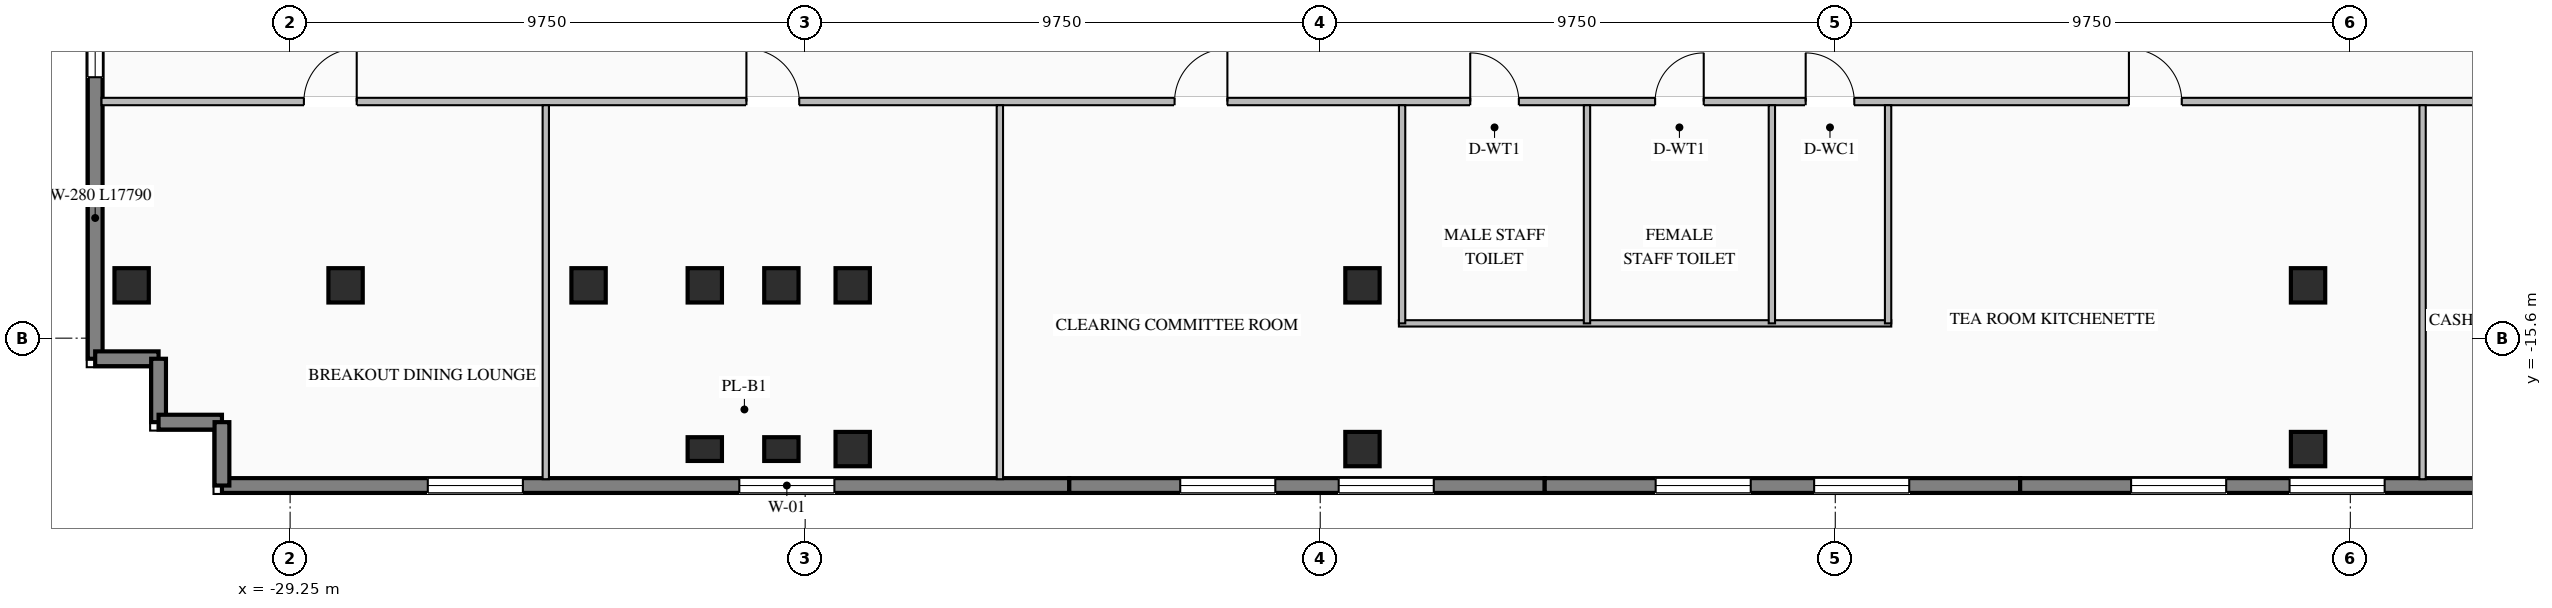
"""IFC4 building model, lengths in metres.
Left out: names, types, materials, properties, quantities, classifications, styles, units other than length and angle.
Written with IfcOpenShell. Run it as: python <this file> out.ifc"""

import sys

from ifc_helpers import new_model, si_unit, direction, frame, frame_2d, origin, origin_2d, place, context, subcontext, project, spatial, rectangle, i_section, extrude, element, fill, save


model = new_model("IFC4")
c1 = context("Model", 3, precision=1e-05, world=origin(), true_north=direction((0.0, 1.0)))
c2 = subcontext(c1, "Body", "Model", "MODEL_VIEW")
j1 = project(units=[si_unit("LENGTHUNIT", "METRE"), si_unit("PLANEANGLEUNIT", "RADIAN")], contexts=[c1])
p1 = place(None, origin())
s1 = spatial("IfcSite", under=j1, at=p1, CompositionType="ELEMENT")
p2 = place(p1, origin())
s2 = spatial("IfcBuilding", under=s1, at=p2, CompositionType="ELEMENT")
p3 = place(p2, frame((0.0, 0.0, 141.55)))
s3 = spatial("IfcBuildingStorey", under=s2, at=p3, CompositionType="ELEMENT", Elevation=141.55)
for number, where, z_axis, x_axis in (
    (1, (-21.4, -14.6, 0.0), (0.0, 0.0, 1.0), (1.0, 0.0, 0.0)),
    (2, (-19.95, -14.6, 0.0), (0.0, 0.0, 1.0), (1.0, 0.0, 0.0)),
    (3, (-18.6, -14.6, 0.0), (0.0, 0.0, 1.0), (1.0, 0.0, 0.0)),
    (4, (-8.95, -14.6, 0.0), (0.0, 0.0, 1.0), (1.0, 0.0, 0.0)),
    (5, (8.95, -14.6, 0.0), (0.0, 0.0, 1.0), (1.0, 0.0, 0.0)),
    (6, (-23.6, -14.6, 0.0), (0.0, 0.0, 1.0), (1.0, 0.0, 0.0)),
    (7, (-28.2, -14.6, 0.0), (0.0, 0.0, 1.0), (1.0, 0.0, 0.0)),
    (8, (-18.6, -17.7, 0.0), (0.0, 0.0, 1.0), (1.0, 0.0, 0.0)),
    (9, (-8.95, -17.7, 0.0), (0.0, 0.0, 1.0), (1.0, 0.0, 0.0)),
    (10, (8.95, -17.7, 0.0), (0.0, 0.0, 1.0), (1.0, 0.0, 0.0)),
    (11, (-32.25, -14.6, 0.0), (0.0, 0.0, 1.0), (1.0, 0.0, 0.0)),
):
    element("IfcColumn", number, at=place(p3, frame(where, z_axis=z_axis, x_axis=x_axis)), inside=s3, PredefinedType="COLUMN", context=c2, shape_type="SweptSolid", body=[
        extrude(i_section(OverallWidth=0.65, OverallDepth=0.65, WebThickness=0.028, FlangeThickness=0.04, at=origin_2d()), origin(), (0.0, 0.0, 1.0), 3.45),
    ])
for number, where, z_axis, x_axis in (
    (12, (-21.4, -17.7, 0.0), (0.0, 0.0, 1.0), (1.0, 0.0, 0.0)),
    (13, (-19.95, -17.7, 0.0), (0.0, 0.0, 1.0), (1.0, 0.0, 0.0)),
):
    element("IfcColumn", number, at=place(p3, frame(where, z_axis=z_axis, x_axis=x_axis)), inside=s3, PredefinedType="PILASTER", context=c2, shape_type="SweptSolid", body=[
        extrude(rectangle(XDim=0.65, YDim=0.45, at=origin_2d()), origin(), (0.0, 0.0, 1.0), 3.45),
    ])
p4 = place(p3, frame((-14.5, -18.39, 0.0), z_axis=(0.0, 0.0, 1.0), x_axis=(-1.0, 0.0, 0.0)))
e14 = element("IfcWall", 14, at=p4, inside=s3, PredefinedType="STANDARD", context=c2, shape_type="SweptSolid", body=[
    extrude(rectangle(XDim=16.04, YDim=0.28, at=frame_2d((8.02, 0.0))), origin(), (0.0, 0.0, 1.0), 3.25),
])
p5 = place(p4, frame((4.447, 0.0, 0.76)))
e15 = element("IfcOpeningElement", 15, at=p5, cuts=e14, PredefinedType="OPENING", context=c2, shape_type="SweptSolid", body=[
    extrude(rectangle(XDim=1.8, YDim=1.95, at=frame_2d((0.9, 0.975))), frame((0.0, 0.15, 0.0), z_axis=(0.0, -1.0, 0.0), x_axis=(1.0, 0.0, 0.0)), (0.0, 0.0, 1.0), 0.3),
])
p6 = place(p4, frame((10.343, 0.0, 0.76)))
e16 = element("IfcOpeningElement", 16, at=p6, cuts=e14, PredefinedType="OPENING", context=c2, shape_type="SweptSolid", body=[
    extrude(rectangle(XDim=1.8, YDim=1.95, at=frame_2d((0.9, 0.975))), frame((0.0, 0.15, 0.0), z_axis=(0.0, -1.0, 0.0), x_axis=(1.0, 0.0, 0.0)), (0.0, 0.0, 1.0), 0.3),
])
p7 = place(p3, frame((-5.5, -18.39, 0.0), z_axis=(0.0, 0.0, 1.0), x_axis=(-1.0, 0.0, 0.0)))
e17 = element("IfcWall", 17, at=p7, inside=s3, PredefinedType="STANDARD", context=c2, shape_type="SweptSolid", body=[
    extrude(rectangle(XDim=9.0, YDim=0.28, at=frame_2d((4.5, 0.0))), origin(), (0.0, 0.0, 1.0), 3.25),
])
p8 = place(p7, frame((2.1, 0.0, 0.76)))
e18 = element("IfcOpeningElement", 18, at=p8, cuts=e17, PredefinedType="OPENING", context=c2, shape_type="SweptSolid", body=[
    extrude(rectangle(XDim=1.8, YDim=1.95, at=frame_2d((0.9, 0.975))), frame((0.0, 0.15, 0.0), z_axis=(0.0, -1.0, 0.0), x_axis=(1.0, 0.0, 0.0)), (0.0, 0.0, 1.0), 0.3),
])
p9 = place(p7, frame((5.1, 0.0, 0.76)))
e19 = element("IfcOpeningElement", 19, at=p9, cuts=e17, PredefinedType="OPENING", context=c2, shape_type="SweptSolid", body=[
    extrude(rectangle(XDim=1.8, YDim=1.95, at=frame_2d((0.9, 0.975))), frame((0.0, 0.15, 0.0), z_axis=(0.0, -1.0, 0.0), x_axis=(1.0, 0.0, 0.0)), (0.0, 0.0, 1.0), 0.3),
])
p10 = place(p3, frame((3.5, -18.39, 0.0), z_axis=(0.0, 0.0, 1.0), x_axis=(-1.0, 0.0, 0.0)))
e20 = element("IfcWall", 20, at=p10, inside=s3, PredefinedType="STANDARD", context=c2, shape_type="SweptSolid", body=[
    extrude(rectangle(XDim=9.0, YDim=0.28, at=frame_2d((4.5, 0.0))), origin(), (0.0, 0.0, 1.0), 3.25),
])
p11 = place(p10, frame((2.1, 0.0, 0.76)))
e21 = element("IfcOpeningElement", 21, at=p11, cuts=e20, PredefinedType="OPENING", context=c2, shape_type="SweptSolid", body=[
    extrude(rectangle(XDim=1.8, YDim=1.95, at=frame_2d((0.9, 0.975))), frame((0.0, 0.15, 0.0), z_axis=(0.0, -1.0, 0.0), x_axis=(1.0, 0.0, 0.0)), (0.0, 0.0, 1.0), 0.3),
])
p12 = place(p10, frame((5.1, 0.0, 0.76)))
e22 = element("IfcOpeningElement", 22, at=p12, cuts=e20, PredefinedType="OPENING", context=c2, shape_type="SweptSolid", body=[
    extrude(rectangle(XDim=1.8, YDim=1.95, at=frame_2d((0.9, 0.975))), frame((0.0, 0.15, 0.0), z_axis=(0.0, -1.0, 0.0), x_axis=(1.0, 0.0, 0.0)), (0.0, 0.0, 1.0), 0.3),
])
p13 = place(p3, frame((12.5, -18.39, 0.0), z_axis=(0.0, 0.0, 1.0), x_axis=(-1.0, 0.0, 0.0)))
e23 = element("IfcWall", 23, at=p13, inside=s3, PredefinedType="STANDARD", context=c2, shape_type="SweptSolid", body=[
    extrude(rectangle(XDim=9.0, YDim=0.28, at=frame_2d((4.5, 0.0))), origin(), (0.0, 0.0, 1.0), 3.25),
])
p14 = place(p13, frame((2.1, 0.0, 0.76)))
e24 = element("IfcOpeningElement", 24, at=p14, cuts=e23, PredefinedType="OPENING", context=c2, shape_type="SweptSolid", body=[
    extrude(rectangle(XDim=1.8, YDim=1.95, at=frame_2d((0.9, 0.975))), frame((0.0, 0.15, 0.0), z_axis=(0.0, -1.0, 0.0), x_axis=(1.0, 0.0, 0.0)), (0.0, 0.0, 1.0), 0.3),
])
p15 = place(p13, frame((5.1, 0.0, 0.76)))
e25 = element("IfcOpeningElement", 25, at=p15, cuts=e23, PredefinedType="OPENING", context=c2, shape_type="SweptSolid", body=[
    extrude(rectangle(XDim=1.8, YDim=1.95, at=frame_2d((0.9, 0.975))), frame((0.0, 0.15, 0.0), z_axis=(0.0, -1.0, 0.0), x_axis=(1.0, 0.0, 0.0)), (0.0, 0.0, 1.0), 0.3),
])
p16 = place(p3, frame((-32.94, -15.99, 0.0), z_axis=(0.0, 0.0, 1.0), x_axis=(0.0, 1.0, 0.0)))
e26 = element("IfcWall", 26, at=p16, inside=s3, PredefinedType="STANDARD", context=c2, shape_type="SweptSolid", body=[
    extrude(rectangle(XDim=17.79, YDim=0.28, at=frame_2d((8.895, 0.0))), origin(), (0.0, 0.0, 1.0), 3.25),
])
p17 = place(p16, frame((5.33, 0.0, 0.76)))
e27 = element("IfcOpeningElement", 27, at=p17, cuts=e26, PredefinedType="OPENING", context=c2, shape_type="SweptSolid", body=[
    extrude(rectangle(XDim=1.2, YDim=1.95, at=frame_2d((0.6, 0.975))), frame((0.0, 0.15, 0.0), z_axis=(0.0, -1.0, 0.0), x_axis=(1.0, 0.0, 0.0)), (0.0, 0.0, 1.0), 0.3),
])
p18 = place(p16, frame((11.26, 0.0, 0.76)))
e28 = element("IfcOpeningElement", 28, at=p18, cuts=e26, PredefinedType="OPENING", context=c2, shape_type="SweptSolid", body=[
    extrude(rectangle(XDim=1.2, YDim=1.95, at=frame_2d((0.6, 0.975))), frame((0.0, 0.15, 0.0), z_axis=(0.0, -1.0, 0.0), x_axis=(1.0, 0.0, 0.0)), (0.0, 0.0, 1.0), 0.3),
])
for number, where, z_axis, x_axis in (
    (29, (-32.94, -15.99, 0.0), (0.0, 0.0, 1.0), (1.0, 0.0, 0.0)),
    (30, (-31.74, -15.99, 0.0), (0.0, 0.0, 1.0), (0.0, -1.0, 0.0)),
    (31, (-31.74, -17.19, 0.0), (0.0, 0.0, 1.0), (1.0, 0.0, 0.0)),
    (32, (-30.54, -17.19, 0.0), (0.0, 0.0, 1.0), (0.0, -1.0, 0.0)),
):
    element("IfcWall", number, at=place(p3, frame(where, z_axis=z_axis, x_axis=x_axis)), inside=s3, PredefinedType="STANDARD", context=c2, shape_type="SweptSolid", body=[
        extrude(rectangle(XDim=1.2, YDim=0.28, at=frame_2d((0.6, 0.0))), origin(), (0.0, 0.0, 1.0), 3.25),
    ])
p19 = place(p3, frame((-32.82, -11.12, 0.0), z_axis=(0.0, 0.0, 1.0), x_axis=(1.0, 0.0, 0.0)))
e33 = element("IfcWall", 33, at=p19, inside=s3, PredefinedType="STANDARD", context=c2, shape_type="SweptSolid", body=[
    extrude(rectangle(XDim=63.64, YDim=0.14, at=frame_2d((31.82, 0.0))), origin(), (0.0, 0.0, 1.0), 3.25),
])
p20 = place(p19, frame((25.91, 0.0, 0.0)))
e34 = element("IfcOpeningElement", 34, at=p20, cuts=e33, PredefinedType="OPENING", context=c2, shape_type="SweptSolid", body=[
    extrude(rectangle(XDim=0.92, YDim=2.08, at=frame_2d((0.46, 1.04))), frame((0.0, 0.08, 0.0), z_axis=(0.0, -1.0, 0.0), x_axis=(1.0, 0.0, 0.0)), (0.0, 0.0, 1.0), 0.16),
])
p21 = place(p19, frame((29.41, 0.0, 0.0)))
e35 = element("IfcOpeningElement", 35, at=p21, cuts=e33, PredefinedType="OPENING", context=c2, shape_type="SweptSolid", body=[
    extrude(rectangle(XDim=0.92, YDim=2.08, at=frame_2d((0.46, 1.04))), frame((0.0, 0.08, 0.0), z_axis=(0.0, -1.0, 0.0), x_axis=(1.0, 0.0, 0.0)), (0.0, 0.0, 1.0), 0.16),
])
p22 = place(p19, frame((32.26, 0.0, 0.0)))
e36 = element("IfcOpeningElement", 36, at=p22, cuts=e33, PredefinedType="OPENING", context=c2, shape_type="SweptSolid", body=[
    extrude(rectangle(XDim=0.92, YDim=2.08, at=frame_2d((0.46, 1.04))), frame((0.0, 0.08, 0.0), z_axis=(0.0, -1.0, 0.0), x_axis=(1.0, 0.0, 0.0)), (0.0, 0.0, 1.0), 0.16),
])
p23 = place(p19, frame((3.831, 0.0, 0.0)))
e37 = element("IfcOpeningElement", 37, at=p23, cuts=e33, PredefinedType="OPENING", context=c2, shape_type="SweptSolid", body=[
    extrude(rectangle(XDim=1.0, YDim=2.08, at=frame_2d((0.5, 1.04))), frame((0.0, 0.08, 0.0), z_axis=(0.0, -1.0, 0.0), x_axis=(1.0, 0.0, 0.0)), (0.0, 0.0, 1.0), 0.16),
])
p24 = place(p19, frame((12.208, 0.0, 0.0)))
e38 = element("IfcOpeningElement", 38, at=p24, cuts=e33, PredefinedType="OPENING", context=c2, shape_type="SweptSolid", body=[
    extrude(rectangle(XDim=1.0, YDim=2.08, at=frame_2d((0.5, 1.04))), frame((0.0, 0.08, 0.0), z_axis=(0.0, -1.0, 0.0), x_axis=(1.0, 0.0, 0.0)), (0.0, 0.0, 1.0), 0.16),
])
p25 = place(p19, frame((20.313, 0.0, 0.0)))
e39 = element("IfcOpeningElement", 39, at=p25, cuts=e33, PredefinedType="OPENING", context=c2, shape_type="SweptSolid", body=[
    extrude(rectangle(XDim=1.0, YDim=2.08, at=frame_2d((0.5, 1.04))), frame((0.0, 0.08, 0.0), z_axis=(0.0, -1.0, 0.0), x_axis=(1.0, 0.0, 0.0)), (0.0, 0.0, 1.0), 0.16),
])
p26 = place(p19, frame((38.379, 0.0, 0.0)))
e40 = element("IfcOpeningElement", 40, at=p26, cuts=e33, PredefinedType="OPENING", context=c2, shape_type="SweptSolid", body=[
    extrude(rectangle(XDim=1.0, YDim=2.08, at=frame_2d((0.5, 1.04))), frame((0.0, 0.08, 0.0), z_axis=(0.0, -1.0, 0.0), x_axis=(1.0, 0.0, 0.0)), (0.0, 0.0, 1.0), 0.16),
])
p27 = place(p19, frame((48.646, 0.0, 0.0)))
e41 = element("IfcOpeningElement", 41, at=p27, cuts=e33, PredefinedType="OPENING", context=c2, shape_type="SweptSolid", body=[
    extrude(rectangle(XDim=1.0, YDim=2.08, at=frame_2d((0.5, 1.04))), frame((0.0, 0.08, 0.0), z_axis=(0.0, -1.0, 0.0), x_axis=(1.0, 0.0, 0.0)), (0.0, 0.0, 1.0), 0.16),
])
p28 = place(p19, frame((58.371, 0.0, 0.0)))
e42 = element("IfcOpeningElement", 42, at=p28, cuts=e33, PredefinedType="OPENING", context=c2, shape_type="SweptSolid", body=[
    extrude(rectangle(XDim=1.0, YDim=2.08, at=frame_2d((0.5, 1.04))), frame((0.0, 0.08, 0.0), z_axis=(0.0, -1.0, 0.0), x_axis=(1.0, 0.0, 0.0)), (0.0, 0.0, 1.0), 0.16),
])
p29 = place(p3, frame((-8.26, -15.32, 0.0), z_axis=(0.0, 0.0, 1.0), x_axis=(1.0, 0.0, 0.0)))
e43 = element("IfcWall", 43, at=p29, inside=s3, PredefinedType="STANDARD", context=c2, shape_type="SweptSolid", body=[
    extrude(rectangle(XDim=9.32, YDim=0.12, at=frame_2d((4.66, 0.0))), origin(), (0.0, 0.0, 1.0), 3.25),
])
for number, where, z_axis, x_axis in (
    (44, (-8.2, -15.32, 0.0), (0.0, 0.0, 1.0), (0.0, 1.0, 0.0)),
    (45, (-4.7, -15.32, 0.0), (0.0, 0.0, 1.0), (0.0, 1.0, 0.0)),
    (46, (-1.2, -15.32, 0.0), (0.0, 0.0, 1.0), (0.0, 1.0, 0.0)),
    (47, (1.0, -15.32, 0.0), (0.0, 0.0, 1.0), (0.0, 1.0, 0.0)),
):
    element("IfcWall", number, at=place(p3, frame(where, z_axis=z_axis, x_axis=x_axis)), inside=s3, PredefinedType="STANDARD", context=c2, shape_type="SweptSolid", body=[
        extrude(rectangle(XDim=4.13, YDim=0.12, at=frame_2d((2.065, 0.0))), origin(), (0.0, 0.0, 1.0), 3.25),
    ])
for number, where, z_axis, x_axis in (
    (48, (-24.41, -18.27, 0.0), (0.0, 0.0, 1.0), (0.0, 1.0, 0.0)),
    (49, (-15.814, -18.27, 0.0), (0.0, 0.0, 1.0), (0.0, 1.0, 0.0)),
    (50, (11.118, -18.27, 0.0), (0.0, 0.0, 1.0), (0.0, 1.0, 0.0)),
):
    element("IfcWall", number, at=place(p3, frame(where, z_axis=z_axis, x_axis=x_axis)), inside=s3, PredefinedType="STANDARD", context=c2, shape_type="SweptSolid", body=[
        extrude(rectangle(XDim=7.08, YDim=0.12, at=frame_2d((3.54, 0.0))), origin(), (0.0, 0.0, 1.0), 3.25),
    ])
p30 = place(p5, origin())
e51 = element("IfcWindow", 51, at=p30, inside=s3, PartitioningType="SINGLE_PANEL", PredefinedType="WINDOW", context=c2, shape_type="SweptSolid", body=[
    extrude(rectangle(XDim=1.8, YDim=1.95, at=frame_2d((0.9, 0.975))), frame((0.0, 0.03, 0.0), z_axis=(0.0, -1.0, 0.0), x_axis=(1.0, 0.0, 0.0)), (0.0, 0.0, 1.0), 0.06),
])
fill(e15, e51)
p31 = place(p6, origin())
e52 = element("IfcWindow", 52, at=p31, inside=s3, PartitioningType="SINGLE_PANEL", PredefinedType="WINDOW", context=c2, shape_type="SweptSolid", body=[
    extrude(rectangle(XDim=1.8, YDim=1.95, at=frame_2d((0.9, 0.975))), frame((0.0, 0.03, 0.0), z_axis=(0.0, -1.0, 0.0), x_axis=(1.0, 0.0, 0.0)), (0.0, 0.0, 1.0), 0.06),
])
fill(e16, e52)
p32 = place(p8, origin())
e53 = element("IfcWindow", 53, at=p32, inside=s3, PartitioningType="SINGLE_PANEL", PredefinedType="WINDOW", context=c2, shape_type="SweptSolid", body=[
    extrude(rectangle(XDim=1.8, YDim=1.95, at=frame_2d((0.9, 0.975))), frame((0.0, 0.03, 0.0), z_axis=(0.0, -1.0, 0.0), x_axis=(1.0, 0.0, 0.0)), (0.0, 0.0, 1.0), 0.06),
])
fill(e18, e53)
p33 = place(p9, origin())
e54 = element("IfcWindow", 54, at=p33, inside=s3, PartitioningType="SINGLE_PANEL", PredefinedType="WINDOW", context=c2, shape_type="SweptSolid", body=[
    extrude(rectangle(XDim=1.8, YDim=1.95, at=frame_2d((0.9, 0.975))), frame((0.0, 0.03, 0.0), z_axis=(0.0, -1.0, 0.0), x_axis=(1.0, 0.0, 0.0)), (0.0, 0.0, 1.0), 0.06),
])
fill(e19, e54)
p34 = place(p11, origin())
e55 = element("IfcWindow", 55, at=p34, inside=s3, PartitioningType="SINGLE_PANEL", PredefinedType="WINDOW", context=c2, shape_type="SweptSolid", body=[
    extrude(rectangle(XDim=1.8, YDim=1.95, at=frame_2d((0.9, 0.975))), frame((0.0, 0.03, 0.0), z_axis=(0.0, -1.0, 0.0), x_axis=(1.0, 0.0, 0.0)), (0.0, 0.0, 1.0), 0.06),
])
fill(e21, e55)
p35 = place(p12, origin())
e56 = element("IfcWindow", 56, at=p35, inside=s3, PartitioningType="SINGLE_PANEL", PredefinedType="WINDOW", context=c2, shape_type="SweptSolid", body=[
    extrude(rectangle(XDim=1.8, YDim=1.95, at=frame_2d((0.9, 0.975))), frame((0.0, 0.03, 0.0), z_axis=(0.0, -1.0, 0.0), x_axis=(1.0, 0.0, 0.0)), (0.0, 0.0, 1.0), 0.06),
])
fill(e22, e56)
p36 = place(p14, origin())
e57 = element("IfcWindow", 57, at=p36, inside=s3, PartitioningType="SINGLE_PANEL", PredefinedType="WINDOW", context=c2, shape_type="SweptSolid", body=[
    extrude(rectangle(XDim=1.8, YDim=1.95, at=frame_2d((0.9, 0.975))), frame((0.0, 0.03, 0.0), z_axis=(0.0, -1.0, 0.0), x_axis=(1.0, 0.0, 0.0)), (0.0, 0.0, 1.0), 0.06),
])
fill(e24, e57)
p37 = place(p15, origin())
e58 = element("IfcWindow", 58, at=p37, inside=s3, PartitioningType="SINGLE_PANEL", PredefinedType="WINDOW", context=c2, shape_type="SweptSolid", body=[
    extrude(rectangle(XDim=1.8, YDim=1.95, at=frame_2d((0.9, 0.975))), frame((0.0, 0.03, 0.0), z_axis=(0.0, -1.0, 0.0), x_axis=(1.0, 0.0, 0.0)), (0.0, 0.0, 1.0), 0.06),
])
fill(e25, e58)
p38 = place(p17, origin())
e59 = element("IfcWindow", 59, at=p38, inside=s3, PartitioningType="SINGLE_PANEL", PredefinedType="WINDOW", context=c2, shape_type="SweptSolid", body=[
    extrude(rectangle(XDim=1.2, YDim=1.95, at=frame_2d((0.6, 0.975))), frame((0.0, 0.03, 0.0), z_axis=(0.0, -1.0, 0.0), x_axis=(1.0, 0.0, 0.0)), (0.0, 0.0, 1.0), 0.06),
])
fill(e27, e59)
p39 = place(p20, origin())
e60 = element("IfcDoor", 60, at=p39, inside=s3, OperationType="SINGLE_SWING_LEFT", PredefinedType="DOOR", context=c2, shape_type="SweptSolid", body=[
    extrude(rectangle(XDim=0.92, YDim=2.08, at=frame_2d((0.46, 1.04))), frame((0.0, 0.025, 0.0), z_axis=(0.0, -1.0, 0.0), x_axis=(1.0, 0.0, 0.0)), (0.0, 0.0, 1.0), 0.05),
])
fill(e34, e60)
p40 = place(p21, origin())
e61 = element("IfcDoor", 61, at=p40, inside=s3, OperationType="SINGLE_SWING_RIGHT", PredefinedType="DOOR", context=c2, shape_type="SweptSolid", body=[
    extrude(rectangle(XDim=0.92, YDim=2.08, at=frame_2d((0.46, 1.04))), frame((0.0, 0.025, 0.0), z_axis=(0.0, -1.0, 0.0), x_axis=(1.0, 0.0, 0.0)), (0.0, 0.0, 1.0), 0.05),
])
fill(e35, e61)
p41 = place(p22, origin())
e62 = element("IfcDoor", 62, at=p41, inside=s3, OperationType="SINGLE_SWING_LEFT", PredefinedType="DOOR", context=c2, shape_type="SweptSolid", body=[
    extrude(rectangle(XDim=0.92, YDim=2.08, at=frame_2d((0.46, 1.04))), frame((0.0, 0.025, 0.0), z_axis=(0.0, -1.0, 0.0), x_axis=(1.0, 0.0, 0.0)), (0.0, 0.0, 1.0), 0.05),
])
fill(e36, e62)
p42 = place(p23, origin())
e63 = element("IfcDoor", 63, at=p42, inside=s3, OperationType="SINGLE_SWING_RIGHT", PredefinedType="DOOR", context=c2, shape_type="SweptSolid", body=[
    extrude(rectangle(XDim=1.0, YDim=2.08, at=frame_2d((0.5, 1.04))), frame((0.0, 0.025, 0.0), z_axis=(0.0, -1.0, 0.0), x_axis=(1.0, 0.0, 0.0)), (0.0, 0.0, 1.0), 0.05),
])
fill(e37, e63)
p43 = place(p24, origin())
e64 = element("IfcDoor", 64, at=p43, inside=s3, OperationType="SINGLE_SWING_LEFT", PredefinedType="DOOR", context=c2, shape_type="SweptSolid", body=[
    extrude(rectangle(XDim=1.0, YDim=2.08, at=frame_2d((0.5, 1.04))), frame((0.0, 0.025, 0.0), z_axis=(0.0, -1.0, 0.0), x_axis=(1.0, 0.0, 0.0)), (0.0, 0.0, 1.0), 0.05),
])
fill(e38, e64)
p44 = place(p25, origin())
e65 = element("IfcDoor", 65, at=p44, inside=s3, OperationType="SINGLE_SWING_RIGHT", PredefinedType="DOOR", context=c2, shape_type="SweptSolid", body=[
    extrude(rectangle(XDim=1.0, YDim=2.08, at=frame_2d((0.5, 1.04))), frame((0.0, 0.025, 0.0), z_axis=(0.0, -1.0, 0.0), x_axis=(1.0, 0.0, 0.0)), (0.0, 0.0, 1.0), 0.05),
])
fill(e39, e65)
p45 = place(p26, origin())
e66 = element("IfcDoor", 66, at=p45, inside=s3, OperationType="SINGLE_SWING_LEFT", PredefinedType="DOOR", context=c2, shape_type="SweptSolid", body=[
    extrude(rectangle(XDim=1.0, YDim=2.08, at=frame_2d((0.5, 1.04))), frame((0.0, 0.025, 0.0), z_axis=(0.0, -1.0, 0.0), x_axis=(1.0, 0.0, 0.0)), (0.0, 0.0, 1.0), 0.05),
])
fill(e40, e66)
save(model, sys.argv[1])
